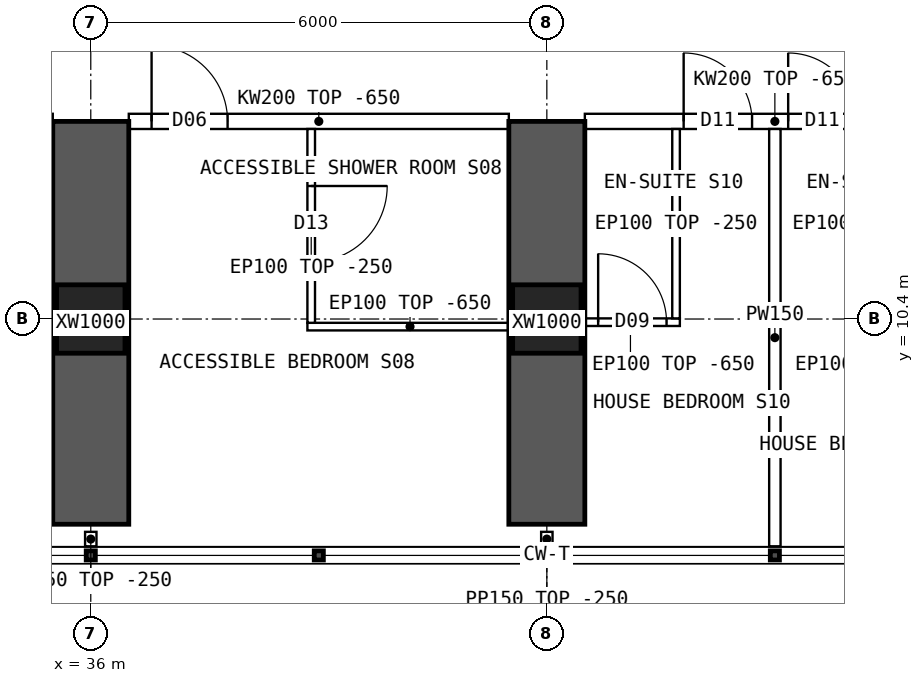
"""IFC4 building model, lengths in metres.
Left out: names, types, materials, properties, quantities, classifications, styles, units other than length and angle.
Written with IfcOpenShell. Run it as: python <this file> out.ifc"""

import sys

from ifc_helpers import new_model, si_unit, direction, frame, frame_2d, origin, origin_2d, place, context, subcontext, project, spatial, polyline, rectangle, hollow_rectangle, outline, extrude, element, fill, save


model = new_model("IFC4")
c1 = context("Model", 3, precision=1e-05, world=origin(), true_north=direction((0.0, 1.0)))
c2 = subcontext(c1, "Body", "Model", "MODEL_VIEW")
j1 = project(units=[si_unit("LENGTHUNIT", "METRE"), si_unit("PLANEANGLEUNIT", "RADIAN")], contexts=[c1])
p1 = place(None, origin())
s1 = spatial("IfcSite", under=j1, at=p1, CompositionType="ELEMENT")
p2 = place(p1, origin())
s2 = spatial("IfcBuilding", under=s1, at=p2, CompositionType="ELEMENT")
p3 = place(p2, frame((0.0, 0.0, 61.45)))
s3 = spatial("IfcBuildingStorey", under=s2, at=p3, CompositionType="ELEMENT", Elevation=61.45)
for number, where, z_axis, x_axis in (
    (1, (36.0, 10.4, 0.0), (0.0, 0.0, 1.0), (1.0, 0.0, 0.0)),
    (2, (42.0, 10.4, 0.0), (0.0, 0.0, 1.0), (1.0, 0.0, 0.0)),
):
    element("IfcColumn", number, at=place(p3, frame(where, z_axis=z_axis, x_axis=x_axis)), inside=s3, PredefinedType="COLUMN", context=c2, shape_type="SweptSolid", body=[
        extrude(hollow_rectangle(XDim=0.9, YDim=0.9, WallThickness=0.09, at=origin_2d()), origin(), (0.0, 0.0, 1.0), 3.75),
    ])
for number, where, z_axis, x_axis in (
    (3, (36.0, 7.7, 0.0), (0.0, 0.0, 1.0), (0.0, 1.0, 0.0)),
    (4, (42.0, 7.7, 0.0), (0.0, 0.0, 1.0), (0.0, 1.0, 0.0)),
):
    element("IfcWall", number, at=place(p3, frame(where, z_axis=z_axis, x_axis=x_axis)), inside=s3, PredefinedType="SHEAR", context=c2, shape_type="SweptSolid", body=[
        extrude(rectangle(XDim=5.3, YDim=1.0, at=frame_2d((2.65, 0.0))), origin(), (0.0, 0.0, 1.0), 3.75),
    ])
p4 = place(p3, frame((36.5, 13.0, 0.0), z_axis=(0.0, 0.0, 1.0), x_axis=(1.0, 0.0, 0.0)))
e5 = element("IfcWall", 5, at=p4, inside=s3, PredefinedType="SOLIDWALL", context=c2, shape_type="SweptSolid", body=[
    extrude(outline(polyline([(0.0, 0.0), (5.0, 0.0), (5.0, 3.1), (0.0, 3.1), (0.0, 0.0)])), frame((0.0, 0.1, 0.0), z_axis=(0.0, -1.0, 0.0), x_axis=(1.0, 0.0, 0.0)), (0.0, 0.0, 1.0), 0.2),
])
p5 = place(p4, frame((0.3, 0.0, 0.0)))
e6 = element("IfcOpeningElement", 6, at=p5, cuts=e5, PredefinedType="OPENING", context=c2, shape_type="SweptSolid", body=[
    extrude(rectangle(XDim=1.0, YDim=2.1, at=frame_2d((0.5, 1.05))), frame((0.0, 0.11, 0.0), z_axis=(0.0, -1.0, 0.0), x_axis=(1.0, 0.0, 0.0)), (0.0, 0.0, 1.0), 0.22),
])
p6 = place(p3, frame((42.5, 13.0, 0.0), z_axis=(0.0, 0.0, 1.0), x_axis=(1.0, 0.0, 0.0)))
e7 = element("IfcWall", 7, at=p6, inside=s3, PredefinedType="SOLIDWALL", context=c2, shape_type="SweptSolid", body=[
    extrude(outline(polyline([(0.0, 0.0), (5.0, 0.0), (5.0, 3.1), (0.0, 3.1), (0.0, 0.0)])), frame((0.0, 0.1, 0.0), z_axis=(0.0, -1.0, 0.0), x_axis=(1.0, 0.0, 0.0)), (0.0, 0.0, 1.0), 0.2),
])
p7 = place(p6, frame((1.3, 0.0, 0.0)))
e8 = element("IfcOpeningElement", 8, at=p7, cuts=e7, PredefinedType="OPENING", context=c2, shape_type="SweptSolid", body=[
    extrude(rectangle(XDim=0.9, YDim=2.1, at=frame_2d((0.45, 1.05))), frame((0.0, 0.11, 0.0), z_axis=(0.0, -1.0, 0.0), x_axis=(1.0, 0.0, 0.0)), (0.0, 0.0, 1.0), 0.22),
])
p8 = place(p6, frame((2.675, 0.0, 0.0)))
e9 = element("IfcOpeningElement", 9, at=p8, cuts=e7, PredefinedType="OPENING", context=c2, shape_type="SweptSolid", body=[
    extrude(rectangle(XDim=0.9, YDim=2.1, at=frame_2d((0.45, 1.05))), frame((0.0, 0.11, 0.0), z_axis=(0.0, -1.0, 0.0), x_axis=(1.0, 0.0, 0.0)), (0.0, 0.0, 1.0), 0.22),
])
p9 = place(p3, frame((38.85, 10.3, 0.0), z_axis=(0.0, 0.0, 1.0), x_axis=(1.0, 0.0, 0.0)))
e10 = element("IfcWall", 10, at=p9, inside=s3, PredefinedType="PARTITIONING", context=c2, shape_type="SweptSolid", body=[
    extrude(outline(polyline([(0.0, 0.0), (2.7, 0.0), (2.7, 3.1), (0.0, 3.1), (0.0, 0.0)])), frame((0.0, 0.05, 0.0), z_axis=(0.0, -1.0, 0.0), x_axis=(1.0, 0.0, 0.0)), (0.0, 0.0, 1.0), 0.1),
])
p10 = place(p3, frame((38.9, 10.35, 0.0), z_axis=(0.0, 0.0, 1.0), x_axis=(0.0, 1.0, 0.0)))
e11 = element("IfcWall", 11, at=p10, inside=s3, PredefinedType="PARTITIONING", context=c2, shape_type="SweptSolid", body=[
    extrude(outline(polyline([(0.0, 0.0), (2.55, 0.0), (2.55, 3.1), (2.502, 3.1), (2.5, 3.5), (0.252, 3.5), (0.25, 3.1), (0.0, 3.1), (0.0, 0.0)])), frame((0.0, 0.05, 0.0), z_axis=(0.0, -1.0, 0.0), x_axis=(1.0, 0.0, 0.0)), (0.0, 0.0, 1.0), 0.1),
])
p11 = place(p10, frame((0.8, 0.0, 0.0)))
e12 = element("IfcOpeningElement", 12, at=p11, cuts=e11, PredefinedType="OPENING", context=c2, shape_type="SweptSolid", body=[
    extrude(rectangle(XDim=1.0, YDim=2.1, at=frame_2d((0.5, 1.05))), frame((0.0, 0.06, 0.0), z_axis=(0.0, -1.0, 0.0), x_axis=(1.0, 0.0, 0.0)), (0.0, 0.0, 1.0), 0.12),
])
p12 = place(p3, frame((45.0, 7.41, 0.0), z_axis=(0.0, 0.0, 1.0), x_axis=(0.0, 1.0, 0.0)))
e13 = element("IfcWall", 13, at=p12, inside=s3, PredefinedType="PARTITIONING", context=c2, shape_type="SweptSolid", body=[
    extrude(outline(polyline([(0.0, 0.0), (5.49, 0.0), (5.49, 3.1), (5.442, 3.1), (5.44, 3.5), (3.192, 3.5), (3.19, 3.1), (2.792, 3.1), (2.79, 3.5), (0.0, 3.5), (0.0, 0.0)])), frame((0.0, 0.075, 0.0), z_axis=(0.0, -1.0, 0.0), x_axis=(1.0, 0.0, 0.0)), (0.0, 0.0, 1.0), 0.15),
])
p13 = place(p3, frame((43.75, 10.358, 0.0), z_axis=(0.0, 0.0, 1.0), x_axis=(-1.0, 0.0, 0.0)))
e14 = element("IfcWall", 14, at=p13, inside=s3, PredefinedType="PARTITIONING", context=c2, shape_type="SweptSolid", body=[
    extrude(outline(polyline([(0.0, 0.0), (1.3, 0.0), (1.3, 3.1), (0.0, 3.1), (0.0, 0.0)])), frame((0.0, 0.05, 0.0), z_axis=(0.0, -1.0, 0.0), x_axis=(1.0, 0.0, 0.0)), (0.0, 0.0, 1.0), 0.1),
])
p14 = place(p13, frame((0.175, 0.0, 0.0)))
e15 = element("IfcOpeningElement", 15, at=p14, cuts=e14, PredefinedType="OPENING", context=c2, shape_type="SweptSolid", body=[
    extrude(rectangle(XDim=0.9, YDim=2.1, at=frame_2d((0.45, 1.05))), frame((0.0, 0.06, 0.0), z_axis=(0.0, -1.0, 0.0), x_axis=(1.0, 0.0, 0.0)), (0.0, 0.0, 1.0), 0.12),
])
p15 = place(p3, frame((43.7, 10.408, 0.0), z_axis=(0.0, 0.0, 1.0), x_axis=(0.0, 1.0, 0.0)))
e16 = element("IfcWall", 16, at=p15, inside=s3, PredefinedType="PARTITIONING", context=c2, shape_type="SweptSolid", body=[
    extrude(outline(polyline([(0.0, 0.0), (2.492, 0.0), (2.492, 3.1), (2.444, 3.1), (2.442, 3.5), (0.194, 3.5), (0.192, 3.1), (0.0, 3.1), (0.0, 0.0)])), frame((0.0, 0.05, 0.0), z_axis=(0.0, -1.0, 0.0), x_axis=(1.0, 0.0, 0.0)), (0.0, 0.0, 1.0), 0.1),
])
for number, where, z_axis, x_axis in (
    (17, (36.0, 7.6, 0.0), (0.0, 0.0, 1.0), (0.0, -1.0, 0.0)),
    (18, (42.0, 7.6, 0.0), (0.0, 0.0, 1.0), (0.0, -1.0, 0.0)),
):
    element("IfcWall", number, at=place(p3, frame(where, z_axis=z_axis, x_axis=x_axis)), inside=s3, PredefinedType="PARTITIONING", context=c2, shape_type="SweptSolid", body=[
        extrude(rectangle(XDim=0.19, YDim=0.15, at=frame_2d((0.095, 0.0))), origin(), (0.0, 0.0, 1.0), 3.5),
    ])
p16 = place(p11, origin())
e19 = element("IfcDoor", 19, at=p16, inside=s3, OperationType="SINGLE_SWING_RIGHT", PredefinedType="DOOR", context=c2, shape_type="SweptSolid", body=[
    extrude(rectangle(XDim=1.0, YDim=2.1, at=frame_2d((0.5, 1.05))), frame((0.0, 0.025, 0.0), z_axis=(0.0, -1.0, 0.0), x_axis=(1.0, 0.0, 0.0)), (0.0, 0.0, 1.0), 0.05),
])
fill(e12, e19)
p17 = place(p5, origin())
e20 = element("IfcDoor", 20, at=p17, inside=s3, OperationType="SINGLE_SWING_LEFT", PredefinedType="DOOR", context=c2, shape_type="SweptSolid", body=[
    extrude(rectangle(XDim=1.0, YDim=2.1, at=frame_2d((0.5, 1.05))), frame((0.0, 0.025, 0.0), z_axis=(0.0, -1.0, 0.0), x_axis=(1.0, 0.0, 0.0)), (0.0, 0.0, 1.0), 0.05),
])
fill(e6, e20)
p18 = place(p14, origin())
e21 = element("IfcDoor", 21, at=p18, inside=s3, OperationType="SINGLE_SWING_RIGHT", PredefinedType="DOOR", context=c2, shape_type="SweptSolid", body=[
    extrude(rectangle(XDim=0.9, YDim=2.1, at=frame_2d((0.45, 1.05))), frame((0.0, 0.025, 0.0), z_axis=(0.0, -1.0, 0.0), x_axis=(1.0, 0.0, 0.0)), (0.0, 0.0, 1.0), 0.05),
])
fill(e15, e21)
p19 = place(p7, origin())
e22 = element("IfcDoor", 22, at=p19, inside=s3, OperationType="SINGLE_SWING_LEFT", PredefinedType="DOOR", context=c2, shape_type="SweptSolid", body=[
    extrude(rectangle(XDim=0.9, YDim=2.1, at=frame_2d((0.45, 1.05))), frame((0.0, 0.025, 0.0), z_axis=(0.0, -1.0, 0.0), x_axis=(1.0, 0.0, 0.0)), (0.0, 0.0, 1.0), 0.05),
])
fill(e8, e22)
p20 = place(p8, origin())
e23 = element("IfcDoor", 23, at=p20, inside=s3, OperationType="SINGLE_SWING_LEFT", PredefinedType="DOOR", context=c2, shape_type="SweptSolid", body=[
    extrude(rectangle(XDim=0.9, YDim=2.1, at=frame_2d((0.45, 1.05))), frame((0.0, 0.025, 0.0), z_axis=(0.0, -1.0, 0.0), x_axis=(1.0, 0.0, 0.0)), (0.0, 0.0, 1.0), 0.05),
])
fill(e9, e23)
save(model, sys.argv[1])
